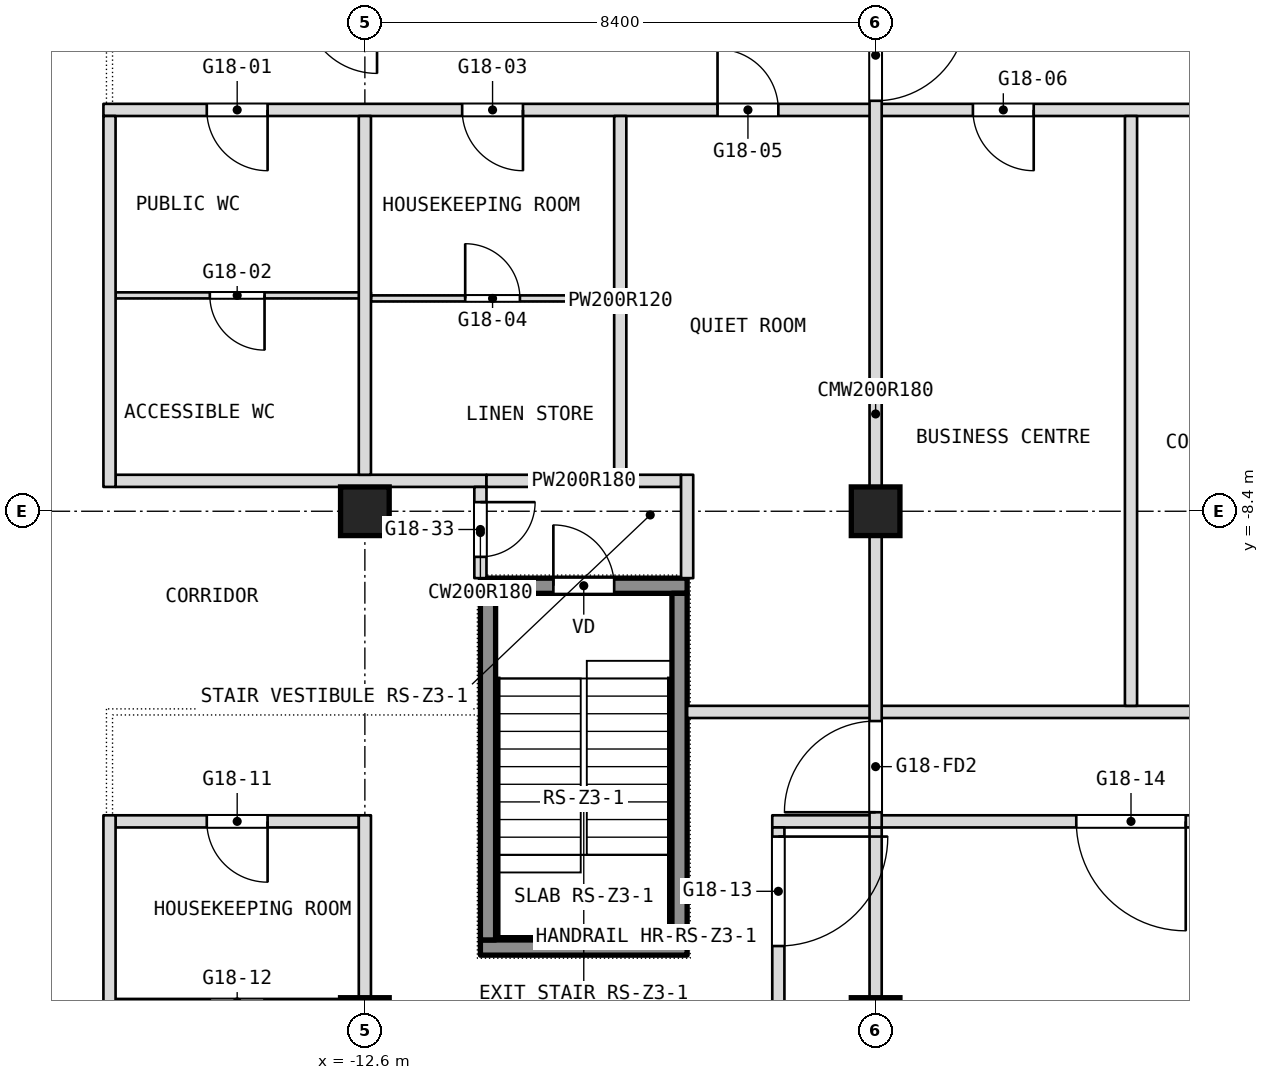
"""IFC4 building model, lengths in metres.
Left out: names, types, materials, properties, quantities, classifications, styles, units other than length and angle.
Written with IfcOpenShell. Run it as: python <this file> out.ifc"""

import sys

from ifc_helpers import new_model, si_unit, direction, frame, frame_2d, origin, origin_2d, place, context, subcontext, project, spatial, rectangle, extrude, element, fill, save


model = new_model("IFC4")
c1 = context("Model", 3, precision=1e-05, world=origin(), true_north=direction((0.0, 1.0)))
c2 = subcontext(c1, "Body", "Model", "MODEL_VIEW")
j1 = project(units=[si_unit("LENGTHUNIT", "METRE"), si_unit("PLANEANGLEUNIT", "RADIAN")], contexts=[c1])
p1 = place(None, origin())
s1 = spatial("IfcSite", under=j1, at=p1, CompositionType="ELEMENT")
p2 = place(p1, origin())
s2 = spatial("IfcBuilding", under=s1, at=p2, CompositionType="ELEMENT")
p3 = place(p2, frame((0.0, 0.0, 216.5)))
s3 = spatial("IfcBuildingStorey", under=s2, at=p3, CompositionType="ELEMENT", Elevation=216.5)
for number, where, z_axis, x_axis in (
    (1, (-12.6, -16.8, 0.0), (0.0, 0.0, 1.0), (1.0, 0.0, 0.0)),
    (2, (-12.6, -8.4, 0.0), (0.0, 0.0, 1.0), (1.0, 0.0, 0.0)),
    (3, (-4.2, -16.8, 0.0), (0.0, 0.0, 1.0), (1.0, 0.0, 0.0)),
    (4, (-4.2, -8.4, 0.0), (0.0, 0.0, 1.0), (1.0, 0.0, 0.0)),
):
    element("IfcColumn", number, at=place(p3, frame(where, z_axis=z_axis, x_axis=x_axis)), inside=s3, PredefinedType="COLUMN", context=c2, shape_type="SweptSolid", body=[
        extrude(rectangle(XDim=0.8, YDim=0.8, at=origin_2d()), origin(), (0.0, 0.0, 1.0), 3.6),
    ])
p4 = place(p3, frame((-16.7, -16.47, 0.0), z_axis=(0.0, 0.0, 1.0), x_axis=(1.0, 0.0, 0.0)))
e5 = element("IfcWall", 5, at=p4, inside=s3, PredefinedType="PARTITIONING", context=c2, shape_type="SweptSolid", body=[
    extrude(rectangle(XDim=4.0, YDim=0.1, at=frame_2d((2.0, 0.0))), origin(), (0.0, 0.0, 1.0), 3.34),
])
p5 = place(p4, frame((1.55, 0.0, 0.0)))
e6 = element("IfcOpeningElement", 6, at=p5, cuts=e5, PredefinedType="OPENING", context=c2, shape_type="SweptSolid", body=[
    extrude(rectangle(XDim=0.9, YDim=2.1, at=frame_2d((0.45, 1.05))), frame((0.0, 0.05, 0.0), z_axis=(0.0, -1.0, 0.0), x_axis=(1.0, 0.0, 0.0)), (0.0, 0.0, 1.0), 0.1),
])
p6 = place(p3, frame((-16.7, -13.5, 0.0), z_axis=(0.0, 0.0, 1.0), x_axis=(1.0, 0.0, 0.0)))
e7 = element("IfcWall", 7, at=p6, inside=s3, PredefinedType="PARTITIONING", context=c2, shape_type="SweptSolid", body=[
    extrude(rectangle(XDim=4.0, YDim=0.2, at=frame_2d((2.0, 0.0))), origin(), (0.0, 0.0, 1.0), 3.34),
])
p7 = place(p6, frame((1.5, 0.0, 0.0)))
e8 = element("IfcOpeningElement", 8, at=p7, cuts=e7, PredefinedType="OPENING", context=c2, shape_type="SweptSolid", body=[
    extrude(rectangle(XDim=1.0, YDim=2.1, at=frame_2d((0.5, 1.05))), frame((0.0, 0.1, 0.0), z_axis=(0.0, -1.0, 0.0), x_axis=(1.0, 0.0, 0.0)), (0.0, 0.0, 1.0), 0.2),
])
p8 = place(p3, frame((-5.9, -13.5, 0.0), z_axis=(0.0, 0.0, 1.0), x_axis=(1.0, 0.0, 0.0)))
e9 = element("IfcWall", 9, at=p8, inside=s3, PredefinedType="PARTITIONING", context=c2, shape_type="SweptSolid", body=[
    extrude(rectangle(XDim=11.6, YDim=0.2, at=frame_2d((5.8, 0.0))), origin(), (0.0, 0.0, 1.0), 3.34),
])
p9 = place(p8, frame((5.0, 0.0, 0.0)))
e10 = element("IfcOpeningElement", 10, at=p9, cuts=e9, PredefinedType="OPENING", context=c2, shape_type="SweptSolid", body=[
    extrude(rectangle(XDim=1.8, YDim=2.1, at=frame_2d((0.9, 1.05))), frame((0.0, 0.1, 0.0), z_axis=(0.0, -1.0, 0.0), x_axis=(1.0, 0.0, 0.0)), (0.0, 0.0, 1.0), 0.2),
])
p10 = place(p3, frame((-7.3, -11.7, 0.0), z_axis=(0.0, 0.0, 1.0), x_axis=(1.0, 0.0, 0.0)))
e11 = element("IfcWall", 11, at=p10, inside=s3, PredefinedType="PARTITIONING", context=c2, shape_type="SweptSolid", body=[
    extrude(rectangle(XDim=14.6, YDim=0.2, at=frame_2d((7.3, 0.0))), origin(), (0.0, 0.0, 1.0), 3.34),
])
p11 = place(p3, frame((-16.7, -7.9, 0.0), z_axis=(0.0, 0.0, 1.0), x_axis=(1.0, 0.0, 0.0)))
e12 = element("IfcWall", 12, at=p11, inside=s3, PredefinedType="PARTITIONING", context=c2, shape_type="SweptSolid", body=[
    extrude(rectangle(XDim=6.1, YDim=0.2, at=frame_2d((3.05, 0.0))), origin(), (0.0, 0.0, 1.0), 3.34),
])
p12 = place(p3, frame((-10.6, -7.9, 0.0), z_axis=(0.0, 0.0, 1.0), x_axis=(1.0, 0.0, 0.0)))
e13 = element("IfcWall", 13, at=p12, inside=s3, PredefinedType="PARTITIONING", context=c2, shape_type="SweptSolid", body=[
    extrude(rectangle(XDim=3.2, YDim=0.2, at=frame_2d((1.6, 0.0))), origin(), (0.0, 0.0, 1.0), 3.34),
])
p13 = place(p3, frame((-12.5, -4.9, 0.0), z_axis=(0.0, 0.0, 1.0), x_axis=(1.0, 0.0, 0.0)))
e14 = element("IfcWall", 14, at=p13, inside=s3, PredefinedType="PARTITIONING", context=c2, shape_type="SweptSolid", body=[
    extrude(rectangle(XDim=4.2, YDim=0.1, at=frame_2d((2.1, 0.0))), origin(), (0.0, 0.0, 1.0), 3.34),
])
p14 = place(p13, frame((1.55, 0.0, 0.0)))
e15 = element("IfcOpeningElement", 15, at=p14, cuts=e14, PredefinedType="OPENING", context=c2, shape_type="SweptSolid", body=[
    extrude(rectangle(XDim=0.9, YDim=2.1, at=frame_2d((0.45, 1.05))), frame((0.0, 0.05, 0.0), z_axis=(0.0, -1.0, 0.0), x_axis=(1.0, 0.0, 0.0)), (0.0, 0.0, 1.0), 0.1),
])
p15 = place(p3, frame((-16.7, -4.85, 0.0), z_axis=(0.0, 0.0, 1.0), x_axis=(1.0, 0.0, 0.0)))
e16 = element("IfcWall", 16, at=p15, inside=s3, PredefinedType="PARTITIONING", context=c2, shape_type="SweptSolid", body=[
    extrude(rectangle(XDim=4.2, YDim=0.1, at=frame_2d((2.1, 0.0))), origin(), (0.0, 0.0, 1.0), 3.34),
])
p16 = place(p15, frame((1.55, 0.0, 0.0)))
e17 = element("IfcOpeningElement", 17, at=p16, cuts=e16, PredefinedType="OPENING", context=c2, shape_type="SweptSolid", body=[
    extrude(rectangle(XDim=0.9, YDim=2.1, at=frame_2d((0.45, 1.05))), frame((0.0, 0.05, 0.0), z_axis=(0.0, -1.0, 0.0), x_axis=(1.0, 0.0, 0.0)), (0.0, 0.0, 1.0), 0.1),
])
p17 = place(p3, frame((-16.9, -1.8, 0.0), z_axis=(0.0, 0.0, 1.0), x_axis=(1.0, 0.0, 0.0)))
e18 = element("IfcWall", 18, at=p17, inside=s3, PredefinedType="PARTITIONING", context=c2, shape_type="SweptSolid", body=[
    extrude(rectangle(XDim=33.8, YDim=0.2, at=frame_2d((16.9, 0.0))), origin(), (0.0, 0.0, 1.0), 3.34),
])
p18 = place(p17, frame((1.7, 0.0, 0.0)))
e19 = element("IfcOpeningElement", 19, at=p18, cuts=e18, PredefinedType="OPENING", context=c2, shape_type="SweptSolid", body=[
    extrude(rectangle(XDim=1.0, YDim=2.1, at=frame_2d((0.5, 1.05))), frame((0.0, 0.1, 0.0), z_axis=(0.0, -1.0, 0.0), x_axis=(1.0, 0.0, 0.0)), (0.0, 0.0, 1.0), 0.2),
])
p19 = place(p17, frame((5.9, 0.0, 0.0)))
e20 = element("IfcOpeningElement", 20, at=p19, cuts=e18, PredefinedType="OPENING", context=c2, shape_type="SweptSolid", body=[
    extrude(rectangle(XDim=1.0, YDim=2.1, at=frame_2d((0.5, 1.05))), frame((0.0, 0.1, 0.0), z_axis=(0.0, -1.0, 0.0), x_axis=(1.0, 0.0, 0.0)), (0.0, 0.0, 1.0), 0.2),
])
p20 = place(p17, frame((10.1, 0.0, 0.0)))
e21 = element("IfcOpeningElement", 21, at=p20, cuts=e18, PredefinedType="OPENING", context=c2, shape_type="SweptSolid", body=[
    extrude(rectangle(XDim=1.0, YDim=2.1, at=frame_2d((0.5, 1.05))), frame((0.0, 0.1, 0.0), z_axis=(0.0, -1.0, 0.0), x_axis=(1.0, 0.0, 0.0)), (0.0, 0.0, 1.0), 0.2),
])
p21 = place(p17, frame((14.3, 0.0, 0.0)))
e22 = element("IfcOpeningElement", 22, at=p21, cuts=e18, PredefinedType="OPENING", context=c2, shape_type="SweptSolid", body=[
    extrude(rectangle(XDim=1.0, YDim=2.1, at=frame_2d((0.5, 1.05))), frame((0.0, 0.1, 0.0), z_axis=(0.0, -1.0, 0.0), x_axis=(1.0, 0.0, 0.0)), (0.0, 0.0, 1.0), 0.2),
])
p22 = place(p17, frame((18.5, 0.0, 0.0)))
e23 = element("IfcOpeningElement", 23, at=p22, cuts=e18, PredefinedType="OPENING", context=c2, shape_type="SweptSolid", body=[
    extrude(rectangle(XDim=1.0, YDim=2.1, at=frame_2d((0.5, 1.05))), frame((0.0, 0.1, 0.0), z_axis=(0.0, -1.0, 0.0), x_axis=(1.0, 0.0, 0.0)), (0.0, 0.0, 1.0), 0.2),
])
p23 = place(p17, frame((22.7, 0.0, 0.0)))
e24 = element("IfcOpeningElement", 24, at=p23, cuts=e18, PredefinedType="OPENING", context=c2, shape_type="SweptSolid", body=[
    extrude(rectangle(XDim=1.0, YDim=2.1, at=frame_2d((0.5, 1.05))), frame((0.0, 0.1, 0.0), z_axis=(0.0, -1.0, 0.0), x_axis=(1.0, 0.0, 0.0)), (0.0, 0.0, 1.0), 0.2),
])
p24 = place(p17, frame((26.9, 0.0, 0.0)))
e25 = element("IfcOpeningElement", 25, at=p24, cuts=e18, PredefinedType="OPENING", context=c2, shape_type="SweptSolid", body=[
    extrude(rectangle(XDim=1.0, YDim=2.1, at=frame_2d((0.5, 1.05))), frame((0.0, 0.1, 0.0), z_axis=(0.0, -1.0, 0.0), x_axis=(1.0, 0.0, 0.0)), (0.0, 0.0, 1.0), 0.2),
])
p25 = place(p17, frame((31.1, 0.0, 0.0)))
e26 = element("IfcOpeningElement", 26, at=p25, cuts=e18, PredefinedType="OPENING", context=c2, shape_type="SweptSolid", body=[
    extrude(rectangle(XDim=1.0, YDim=2.1, at=frame_2d((0.5, 1.05))), frame((0.0, 0.1, 0.0), z_axis=(0.0, -1.0, 0.0), x_axis=(1.0, 0.0, 0.0)), (0.0, 0.0, 1.0), 0.2),
])
p26 = place(p3, frame((0.0, -11.6, 0.0), z_axis=(0.0, 0.0, 1.0), x_axis=(0.0, 1.0, 0.0)))
e27 = element("IfcWall", 27, at=p26, inside=s3, PredefinedType="PARTITIONING", context=c2, shape_type="SweptSolid", body=[
    extrude(rectangle(XDim=9.7, YDim=0.2, at=frame_2d((4.85, 0.0))), origin(), (0.0, 0.0, 1.0), 3.34),
])
p27 = place(p3, frame((-4.2, -22.0, 0.0), z_axis=(0.0, 0.0, 1.0), x_axis=(0.0, 1.0, 0.0)))
e28 = element("IfcWall", 28, at=p27, inside=s3, PredefinedType="PARTITIONING", context=c2, shape_type="SweptSolid", body=[
    extrude(rectangle(XDim=8.4, YDim=0.2, at=frame_2d((4.2, 0.0))), origin(), (0.0, 0.0, 1.0), 3.34),
])
p28 = place(p27, frame((0.25, 0.0, 0.0)))
e29 = element("IfcOpeningElement", 29, at=p28, cuts=e28, PredefinedType="OPENING", context=c2, shape_type="SweptSolid", body=[
    extrude(rectangle(XDim=1.5, YDim=2.1, at=frame_2d((0.75, 1.05))), frame((0.0, 0.1, 0.0), z_axis=(0.0, -1.0, 0.0), x_axis=(1.0, 0.0, 0.0)), (0.0, 0.0, 1.0), 0.2),
])
p29 = place(p3, frame((-4.2, -13.6, 0.0), z_axis=(0.0, 0.0, 1.0), x_axis=(0.0, 1.0, 0.0)))
e30 = element("IfcWall", 30, at=p29, inside=s3, PredefinedType="PARTITIONING", context=c2, shape_type="SweptSolid", body=[
    extrude(rectangle(XDim=13.6, YDim=0.2, at=frame_2d((6.8, 0.0))), origin(), (0.0, 0.0, 1.0), 3.34),
])
p30 = place(p29, frame((11.95, 0.0, 0.0)))
e31 = element("IfcOpeningElement", 31, at=p30, cuts=e30, PredefinedType="OPENING", context=c2, shape_type="SweptSolid", body=[
    extrude(rectangle(XDim=1.5, YDim=2.1, at=frame_2d((0.75, 1.05))), frame((0.0, 0.1, 0.0), z_axis=(0.0, -1.0, 0.0), x_axis=(1.0, 0.0, 0.0)), (0.0, 0.0, 1.0), 0.2),
])
p31 = place(p29, frame((0.25, 0.0, 0.0)))
e32 = element("IfcOpeningElement", 32, at=p31, cuts=e30, PredefinedType="OPENING", context=c2, shape_type="SweptSolid", body=[
    extrude(rectangle(XDim=1.5, YDim=2.1, at=frame_2d((0.75, 1.05))), frame((0.0, 0.1, 0.0), z_axis=(0.0, -1.0, 0.0), x_axis=(1.0, 0.0, 0.0)), (0.0, 0.0, 1.0), 0.2),
])
p32 = place(p3, frame((-5.8, -18.5, 0.0), z_axis=(0.0, 0.0, 1.0), x_axis=(0.0, 1.0, 0.0)))
e33 = element("IfcWall", 33, at=p32, inside=s3, PredefinedType="PARTITIONING", context=c2, shape_type="SweptSolid", body=[
    extrude(rectangle(XDim=4.9, YDim=0.2, at=frame_2d((2.45, 0.0))), origin(), (0.0, 0.0, 1.0), 3.34),
])
p33 = place(p32, frame((2.95, 0.0, 0.0)))
e34 = element("IfcOpeningElement", 34, at=p33, cuts=e33, PredefinedType="OPENING", context=c2, shape_type="SweptSolid", body=[
    extrude(rectangle(XDim=1.8, YDim=2.1, at=frame_2d((0.9, 1.05))), frame((0.0, 0.1, 0.0), z_axis=(0.0, -1.0, 0.0), x_axis=(1.0, 0.0, 0.0)), (0.0, 0.0, 1.0), 0.2),
])
p34 = place(p3, frame((-7.3, -9.5, 0.0), z_axis=(0.0, 0.0, 1.0), x_axis=(0.0, 1.0, 0.0)))
e35 = element("IfcWall", 35, at=p34, inside=s3, PredefinedType="PARTITIONING", context=c2, shape_type="SweptSolid", body=[
    extrude(rectangle(XDim=1.7, YDim=0.2, at=frame_2d((0.85, 0.0))), origin(), (0.0, 0.0, 1.0), 3.34),
])
p35 = place(p3, frame((-8.4, -8.0, 0.0), z_axis=(0.0, 0.0, 1.0), x_axis=(0.0, 1.0, 0.0)))
e36 = element("IfcWall", 36, at=p35, inside=s3, PredefinedType="PARTITIONING", context=c2, shape_type="SweptSolid", body=[
    extrude(rectangle(XDim=6.1, YDim=0.2, at=frame_2d((3.05, 0.0))), origin(), (0.0, 0.0, 1.0), 3.34),
])
p36 = place(p3, frame((-10.7, -9.5, 0.0), z_axis=(0.0, 0.0, 1.0), x_axis=(0.0, 1.0, 0.0)))
e37 = element("IfcWall", 37, at=p36, inside=s3, PredefinedType="PARTITIONING", context=c2, shape_type="SweptSolid", body=[
    extrude(rectangle(XDim=1.5, YDim=0.2, at=frame_2d((0.75, 0.0))), origin(), (0.0, 0.0, 1.0), 3.34),
])
p37 = place(p36, frame((0.35, 0.0, 0.0)))
e38 = element("IfcOpeningElement", 38, at=p37, cuts=e37, PredefinedType="OPENING", context=c2, shape_type="SweptSolid", body=[
    extrude(rectangle(XDim=0.9, YDim=2.1, at=frame_2d((0.45, 1.05))), frame((0.0, 0.1, 0.0), z_axis=(0.0, -1.0, 0.0), x_axis=(1.0, 0.0, 0.0)), (0.0, 0.0, 1.0), 0.2),
])
p38 = place(p3, frame((-12.6, -7.8, 0.0), z_axis=(0.0, 0.0, 1.0), x_axis=(0.0, 1.0, 0.0)))
e39 = element("IfcWall", 39, at=p38, inside=s3, PredefinedType="PARTITIONING", context=c2, shape_type="SweptSolid", body=[
    extrude(rectangle(XDim=5.9, YDim=0.2, at=frame_2d((2.95, 0.0))), origin(), (0.0, 0.0, 1.0), 3.34),
])
p39 = place(p3, frame((-12.6, -18.5, 0.0), z_axis=(0.0, 0.0, 1.0), x_axis=(0.0, 1.0, 0.0)))
e40 = element("IfcWall", 40, at=p39, inside=s3, PredefinedType="PARTITIONING", context=c2, shape_type="SweptSolid", body=[
    extrude(rectangle(XDim=5.1, YDim=0.2, at=frame_2d((2.55, 0.0))), origin(), (0.0, 0.0, 1.0), 3.34),
])
p40 = place(p3, frame((-16.8, -20.2, 0.0), z_axis=(0.0, 0.0, 1.0), x_axis=(0.0, 1.0, 0.0)))
e41 = element("IfcWall", 41, at=p40, inside=s3, PredefinedType="PARTITIONING", context=c2, shape_type="SweptSolid", body=[
    extrude(rectangle(XDim=6.8, YDim=0.2, at=frame_2d((3.4, 0.0))), origin(), (0.0, 0.0, 1.0), 3.34),
])
p41 = place(p3, frame((-16.8, -8.0, 0.0), z_axis=(0.0, 0.0, 1.0), x_axis=(0.0, 1.0, 0.0)))
e42 = element("IfcWall", 42, at=p41, inside=s3, PredefinedType="PARTITIONING", context=c2, shape_type="SweptSolid", body=[
    extrude(rectangle(XDim=6.1, YDim=0.2, at=frame_2d((3.05, 0.0))), origin(), (0.0, 0.0, 1.0), 3.34),
])
p42 = place(p3, frame((-10.7, -15.575, 0.1), z_axis=(0.0, 0.0, 1.0), x_axis=(1.0, 0.0, 0.0)))
e43 = element("IfcWall", 43, at=p42, inside=s3, PredefinedType="SHEAR", context=c2, shape_type="SweptSolid", body=[
    extrude(rectangle(XDim=3.4, YDim=0.25, at=frame_2d((1.7, 0.0))), origin(), (0.0, 0.0, 1.0), 3.6),
])
p43 = place(p3, frame((-10.7, -9.625, 0.1), z_axis=(0.0, 0.0, 1.0), x_axis=(1.0, 0.0, 0.0)))
e44 = element("IfcWall", 44, at=p43, inside=s3, PredefinedType="SHEAR", context=c2, shape_type="SweptSolid", body=[
    extrude(rectangle(XDim=3.4, YDim=0.25, at=frame_2d((1.7, 0.0))), origin(), (0.0, 0.0, 1.0), 3.6),
])
p44 = place(p43, frame((1.2, 0.0, 0.0)))
e45 = element("IfcOpeningElement", 45, at=p44, cuts=e44, PredefinedType="OPENING", context=c2, shape_type="SweptSolid", body=[
    extrude(rectangle(XDim=1.0, YDim=2.1, at=frame_2d((0.5, 1.05))), frame((0.0, 0.125, 0.0), z_axis=(0.0, -1.0, 0.0), x_axis=(1.0, 0.0, 0.0)), (0.0, 0.0, 1.0), 0.25),
])
for number, where, z_axis, x_axis in (
    (46, (-10.575, -15.45, 0.1), (0.0, 0.0, 1.0), (0.0, 1.0, 0.0)),
    (47, (-7.425, -15.45, 0.1), (0.0, 0.0, 1.0), (0.0, 1.0, 0.0)),
):
    element("IfcWall", number, at=place(p3, frame(where, z_axis=z_axis, x_axis=x_axis)), inside=s3, PredefinedType="SHEAR", context=c2, shape_type="SweptSolid", body=[
        extrude(rectangle(XDim=5.7, YDim=0.25, at=frame_2d((2.85, 0.0))), origin(), (0.0, 0.0, 1.0), 3.6),
    ])
p45 = place(p5, origin())
e48 = element("IfcDoor", 48, at=p45, inside=s3, OperationType="SINGLE_SWING_LEFT", PredefinedType="DOOR", context=c2, shape_type="SweptSolid", body=[
    extrude(rectangle(XDim=0.9, YDim=2.1, at=frame_2d((0.45, 1.05))), frame((0.0, 0.025, 0.0), z_axis=(0.0, -1.0, 0.0), x_axis=(1.0, 0.0, 0.0)), (0.0, 0.0, 1.0), 0.05),
])
fill(e6, e48)
p46 = place(p7, origin())
e49 = element("IfcDoor", 49, at=p46, inside=s3, OperationType="SINGLE_SWING_LEFT", PredefinedType="DOOR", context=c2, shape_type="SweptSolid", body=[
    extrude(rectangle(XDim=1.0, YDim=2.1, at=frame_2d((0.5, 1.05))), frame((0.0, 0.025, 0.0), z_axis=(0.0, -1.0, 0.0), x_axis=(1.0, 0.0, 0.0)), (0.0, 0.0, 1.0), 0.05),
])
fill(e8, e49)
p47 = place(p9, origin())
e50 = element("IfcDoor", 50, at=p47, inside=s3, OperationType="DOUBLE_DOOR_SINGLE_SWING", PredefinedType="DOOR", context=c2, shape_type="SweptSolid", body=[
    extrude(rectangle(XDim=1.8, YDim=2.1, at=frame_2d((0.9, 1.05))), frame((0.0, 0.025, 0.0), z_axis=(0.0, -1.0, 0.0), x_axis=(1.0, 0.0, 0.0)), (0.0, 0.0, 1.0), 0.05),
])
fill(e10, e50)
p48 = place(p14, origin())
e51 = element("IfcDoor", 51, at=p48, inside=s3, OperationType="SINGLE_SWING_RIGHT", PredefinedType="DOOR", context=c2, shape_type="SweptSolid", body=[
    extrude(rectangle(XDim=0.9, YDim=2.1, at=frame_2d((0.45, 1.05))), frame((0.0, 0.025, 0.0), z_axis=(0.0, -1.0, 0.0), x_axis=(1.0, 0.0, 0.0)), (0.0, 0.0, 1.0), 0.05),
])
fill(e15, e51)
p49 = place(p16, origin())
e52 = element("IfcDoor", 52, at=p49, inside=s3, OperationType="SINGLE_SWING_RIGHT", PredefinedType="DOOR", context=c2, shape_type="SweptSolid", body=[
    extrude(rectangle(XDim=0.9, YDim=2.1, at=frame_2d((0.45, 1.05))), frame((0.0, 0.025, 0.0), z_axis=(0.0, -1.0, 0.0), x_axis=(1.0, 0.0, 0.0)), (0.0, 0.0, 1.0), 0.05),
])
fill(e17, e52)
p50 = place(p18, origin())
e53 = element("IfcDoor", 53, at=p50, inside=s3, OperationType="SINGLE_SWING_LEFT", PredefinedType="DOOR", context=c2, shape_type="SweptSolid", body=[
    extrude(rectangle(XDim=1.0, YDim=2.1, at=frame_2d((0.5, 1.05))), frame((0.0, 0.025, 0.0), z_axis=(0.0, -1.0, 0.0), x_axis=(1.0, 0.0, 0.0)), (0.0, 0.0, 1.0), 0.05),
])
fill(e19, e53)
p51 = place(p19, origin())
e54 = element("IfcDoor", 54, at=p51, inside=s3, OperationType="SINGLE_SWING_LEFT", PredefinedType="DOOR", context=c2, shape_type="SweptSolid", body=[
    extrude(rectangle(XDim=1.0, YDim=2.1, at=frame_2d((0.5, 1.05))), frame((0.0, 0.025, 0.0), z_axis=(0.0, -1.0, 0.0), x_axis=(1.0, 0.0, 0.0)), (0.0, 0.0, 1.0), 0.05),
])
fill(e20, e54)
p52 = place(p20, origin())
e55 = element("IfcDoor", 55, at=p52, inside=s3, OperationType="SINGLE_SWING_RIGHT", PredefinedType="DOOR", context=c2, shape_type="SweptSolid", body=[
    extrude(rectangle(XDim=1.0, YDim=2.1, at=frame_2d((0.5, 1.05))), frame((0.0, 0.025, 0.0), z_axis=(0.0, -1.0, 0.0), x_axis=(1.0, 0.0, 0.0)), (0.0, 0.0, 1.0), 0.05),
])
fill(e21, e55)
p53 = place(p21, origin())
e56 = element("IfcDoor", 56, at=p53, inside=s3, OperationType="SINGLE_SWING_LEFT", PredefinedType="DOOR", context=c2, shape_type="SweptSolid", body=[
    extrude(rectangle(XDim=1.0, YDim=2.1, at=frame_2d((0.5, 1.05))), frame((0.0, 0.025, 0.0), z_axis=(0.0, -1.0, 0.0), x_axis=(1.0, 0.0, 0.0)), (0.0, 0.0, 1.0), 0.05),
])
fill(e22, e56)
p54 = place(p33, origin())
e57 = element("IfcDoor", 57, at=p54, inside=s3, OperationType="DOUBLE_DOOR_SINGLE_SWING", PredefinedType="DOOR", context=c2, shape_type="SweptSolid", body=[
    extrude(rectangle(XDim=1.8, YDim=2.1, at=frame_2d((0.9, 1.05))), frame((0.0, 0.025, 0.0), z_axis=(0.0, -1.0, 0.0), x_axis=(1.0, 0.0, 0.0)), (0.0, 0.0, 1.0), 0.05),
])
fill(e34, e57)
p55 = place(p37, origin())
e58 = element("IfcDoor", 58, at=p55, inside=s3, OperationType="SINGLE_SWING_LEFT", PredefinedType="DOOR", context=c2, shape_type="SweptSolid", body=[
    extrude(rectangle(XDim=0.9, YDim=2.1, at=frame_2d((0.45, 1.05))), frame((0.0, 0.025, 0.0), z_axis=(0.0, -1.0, 0.0), x_axis=(1.0, 0.0, 0.0)), (0.0, 0.0, 1.0), 0.05),
])
fill(e38, e58)
p56 = place(p44, origin())
e59 = element("IfcDoor", 59, at=p56, inside=s3, OperationType="SINGLE_SWING_LEFT", PredefinedType="DOOR", context=c2, shape_type="SweptSolid", body=[
    extrude(rectangle(XDim=1.0, YDim=2.1, at=frame_2d((0.5, 1.05))), frame((0.0, 0.025, 0.0), z_axis=(0.0, -1.0, 0.0), x_axis=(1.0, 0.0, 0.0)), (0.0, 0.0, 1.0), 0.05),
])
fill(e45, e59)
p57 = place(p30, origin())
e60 = element("IfcDoor", 60, at=p57, inside=s3, OperationType="DOUBLE_DOOR_DOUBLE_SWING", PredefinedType="DOOR", context=c2, shape_type="SweptSolid", body=[
    extrude(rectangle(XDim=1.5, YDim=2.1, at=frame_2d((0.75, 1.05))), frame((0.0, 0.025, 0.0), z_axis=(0.0, -1.0, 0.0), x_axis=(1.0, 0.0, 0.0)), (0.0, 0.0, 1.0), 0.05),
])
fill(e31, e60)
p58 = place(p31, origin())
e61 = element("IfcDoor", 61, at=p58, inside=s3, OperationType="DOUBLE_DOOR_DOUBLE_SWING", PredefinedType="DOOR", context=c2, shape_type="SweptSolid", body=[
    extrude(rectangle(XDim=1.5, YDim=2.1, at=frame_2d((0.75, 1.05))), frame((0.0, 0.025, 0.0), z_axis=(0.0, -1.0, 0.0), x_axis=(1.0, 0.0, 0.0)), (0.0, 0.0, 1.0), 0.05),
])
fill(e32, e61)
save(model, sys.argv[1])
